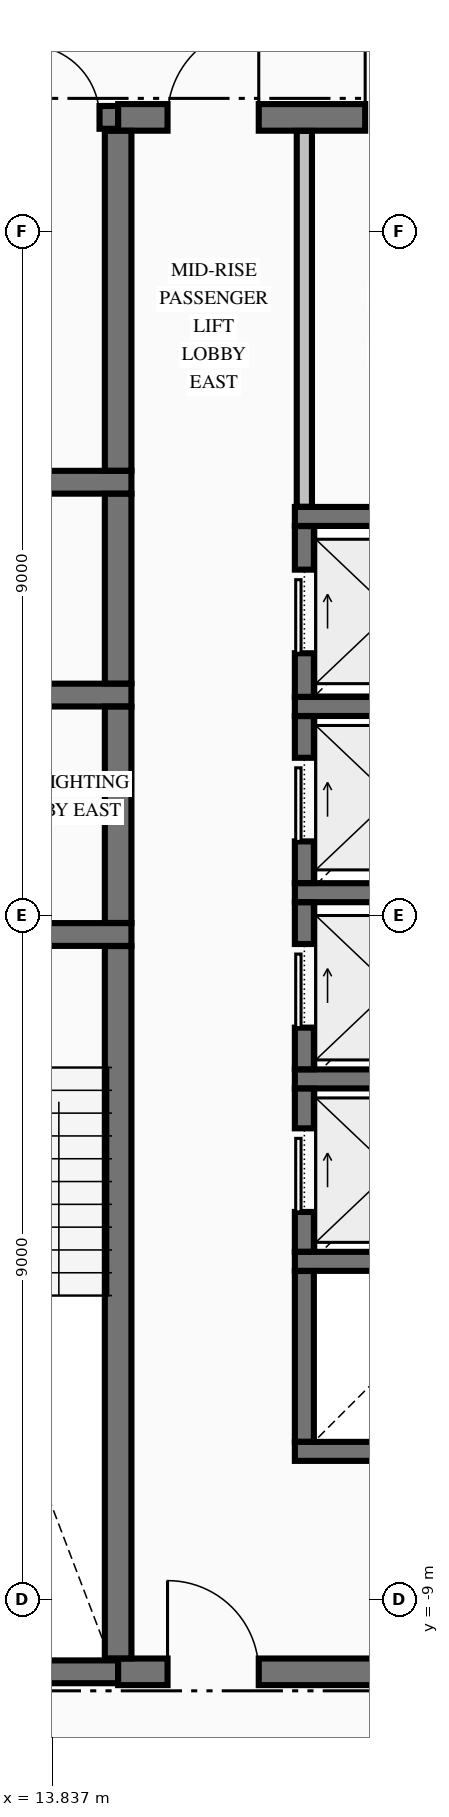
"""IFC4 building model, lengths in metres.
Left out: names, types, materials, properties, quantities, classifications, styles, units other than length and angle.
Written with IfcOpenShell. Run it as: python <this file> out.ifc"""

import sys

from ifc_helpers import new_model, si_unit, direction, frame, frame_2d, origin, place, context, subcontext, project, spatial, rectangle, extrude, element, fill, save


model = new_model("IFC4")
c1 = context("Model", 3, precision=1e-05, world=origin(), true_north=direction((0.0, 1.0)))
c2 = subcontext(c1, "Body", "Model", "MODEL_VIEW")
j1 = project(units=[si_unit("LENGTHUNIT", "METRE"), si_unit("PLANEANGLEUNIT", "RADIAN")], contexts=[c1])
p1 = place(None, origin())
s1 = spatial("IfcSite", under=j1, at=p1, CompositionType="ELEMENT")
p2 = place(p1, origin())
s2 = spatial("IfcBuilding", under=s1, at=p2, CompositionType="ELEMENT")
p3 = place(p2, frame((0.0, 0.0, 112.78)))
s3 = spatial("IfcBuildingStorey", under=s2, at=p3, CompositionType="ELEMENT", Elevation=112.78)
p4 = place(p3, frame((11.504, -9.95, 0.0), z_axis=(0.0, 0.0, 1.0), x_axis=(1.0, 0.0, 0.0)))
e1 = element("IfcWall", 1, at=p4, inside=s3, PredefinedType="SHEAR", context=c2, shape_type="SweptSolid", body=[
    extrude(rectangle(XDim=3.196, YDim=0.3, at=frame_2d((1.598, 0.0))), origin(), (0.0, 0.0, 1.0), 3.145),
])
p5 = place(p3, frame((14.7, -9.95, 0.0), z_axis=(0.0, 0.0, 1.0), x_axis=(1.0, 0.0, 0.0)))
e2 = element("IfcWall", 2, at=p5, inside=s3, PredefinedType="SHEAR", context=c2, shape_type="SweptSolid", body=[
    extrude(rectangle(XDim=4.796, YDim=0.35, at=frame_2d((2.398, 0.0))), origin(), (0.0, 0.0, 1.0), 3.145),
])
p6 = place(p5, frame((0.65, 0.0, 0.0)))
e3 = element("IfcOpeningElement", 3, at=p6, cuts=e2, PredefinedType="OPENING", context=c2, shape_type="SweptSolid", body=[
    extrude(rectangle(XDim=1.2, YDim=2.15, at=frame_2d((0.6, 1.075))), frame((0.0, 0.185, 0.0), z_axis=(0.0, -1.0, 0.0), x_axis=(1.0, 0.0, 0.0)), (0.0, 0.0, 1.0), 0.37),
])
for number, where, z_axis, x_axis in (
    (4, (17.025, -7.05, 0.0), (0.0, 0.0, 1.0), (1.0, 0.0, 0.0)),
    (5, (17.025, -4.55, 0.0), (0.0, 0.0, 1.0), (1.0, 0.0, 0.0)),
    (6, (17.025, -2.15, 0.0), (0.0, 0.0, 1.0), (1.0, 0.0, 0.0)),
):
    element("IfcWall", number, at=place(p3, frame(where, z_axis=z_axis, x_axis=x_axis)), inside=s3, PredefinedType="SOLIDWALL", context=c2, shape_type="SweptSolid", body=[
        extrude(rectangle(XDim=3.15, YDim=0.25, at=frame_2d((1.575, 0.0))), origin(), (0.0, 0.0, 1.0), 3.145),
    ])
p7 = place(p3, frame((11.504, -0.25, 0.0), z_axis=(0.0, 0.0, 1.0), x_axis=(1.0, 0.0, 0.0)))
e7 = element("IfcWall", 7, at=p7, inside=s3, PredefinedType="SHEAR", context=c2, shape_type="SweptSolid", body=[
    extrude(rectangle(XDim=3.371, YDim=0.3, at=frame_2d((1.686, 0.0))), origin(), (0.0, 0.0, 1.0), 3.145),
])
p8 = place(p7, frame((1.096, 0.0, 0.0)))
e8 = element("IfcOpeningElement", 8, at=p8, cuts=e7, PredefinedType="OPENING", context=c2, shape_type="SweptSolid", body=[
    extrude(rectangle(XDim=1.1, YDim=2.15, at=frame_2d((0.55, 1.075))), frame((0.0, 0.16, 0.0), z_axis=(0.0, -1.0, 0.0), x_axis=(1.0, 0.0, 0.0)), (0.0, 0.0, 1.0), 0.32),
])
p9 = place(p3, frame((17.025, 0.3, 0.0), z_axis=(0.0, 0.0, 1.0), x_axis=(1.0, 0.0, 0.0)))
e9 = element("IfcWall", 9, at=p9, inside=s3, PredefinedType="SOLIDWALL", context=c2, shape_type="SweptSolid", body=[
    extrude(rectangle(XDim=2.471, YDim=0.25, at=frame_2d((1.236, 0.0))), origin(), (0.0, 0.0, 1.0), 3.145),
])
p10 = place(p3, frame((17.025, 2.75, 0.0), z_axis=(0.0, 0.0, 1.0), x_axis=(1.0, 0.0, 0.0)))
e10 = element("IfcWall", 10, at=p10, inside=s3, PredefinedType="SOLIDWALL", context=c2, shape_type="SweptSolid", body=[
    extrude(rectangle(XDim=3.15, YDim=0.25, at=frame_2d((1.575, 0.0))), origin(), (0.0, 0.0, 1.0), 3.145),
])
p11 = place(p3, frame((10.85, 2.9, 0.0), z_axis=(0.0, 0.0, 1.0), x_axis=(1.0, 0.0, 0.0)))
e11 = element("IfcWall", 11, at=p11, inside=s3, PredefinedType="SHEAR", context=c2, shape_type="SweptSolid", body=[
    extrude(rectangle(XDim=4.025, YDim=0.3, at=frame_2d((2.012, 0.0))), origin(), (0.0, 0.0, 1.0), 3.145),
])
p12 = place(p11, frame((0.85, 0.0, 0.0)))
e12 = element("IfcOpeningElement", 12, at=p12, cuts=e11, PredefinedType="OPENING", context=c2, shape_type="SweptSolid", body=[
    extrude(rectangle(XDim=1.1, YDim=2.2, at=frame_2d((0.55, 1.1))), frame((0.0, 0.16, 0.0), z_axis=(0.0, -1.0, 0.0), x_axis=(1.0, 0.0, 0.0)), (0.0, 0.0, 1.0), 0.32),
])
p13 = place(p3, frame((17.025, 5.25, 0.0), z_axis=(0.0, 0.0, 1.0), x_axis=(1.0, 0.0, 0.0)))
e13 = element("IfcWall", 13, at=p13, inside=s3, PredefinedType="SOLIDWALL", context=c2, shape_type="SweptSolid", body=[
    extrude(rectangle(XDim=3.15, YDim=0.25, at=frame_2d((1.575, 0.0))), origin(), (0.0, 0.0, 1.0), 3.145),
])
p14 = place(p3, frame((10.85, 5.7, 0.0), z_axis=(0.0, 0.0, 1.0), x_axis=(1.0, 0.0, 0.0)))
e14 = element("IfcWall", 14, at=p14, inside=s3, PredefinedType="SHEAR", context=c2, shape_type="SweptSolid", body=[
    extrude(rectangle(XDim=4.025, YDim=0.3, at=frame_2d((2.012, 0.0))), origin(), (0.0, 0.0, 1.0), 3.145),
])
p15 = place(p3, frame((11.504, 10.5, 0.0), z_axis=(0.0, 0.0, 1.0), x_axis=(1.0, 0.0, 0.0)))
e15 = element("IfcWall", 15, at=p15, inside=s3, PredefinedType="SHEAR", context=c2, shape_type="SweptSolid", body=[
    extrude(rectangle(XDim=3.196, YDim=0.3, at=frame_2d((1.598, 0.0))), origin(), (0.0, 0.0, 1.0), 3.145),
])
p16 = place(p15, frame((2.001, 0.0, 0.0)))
e16 = element("IfcOpeningElement", 16, at=p16, cuts=e15, PredefinedType="OPENING", context=c2, shape_type="SweptSolid", body=[
    extrude(rectangle(XDim=0.95, YDim=2.15, at=frame_2d((0.475, 1.075))), frame((0.0, 0.16, 0.0), z_axis=(0.0, -1.0, 0.0), x_axis=(1.0, 0.0, 0.0)), (0.0, 0.0, 1.0), 0.32),
])
p17 = place(p3, frame((14.7, 10.5, 0.0), z_axis=(0.0, 0.0, 1.0), x_axis=(1.0, 0.0, 0.0)))
e17 = element("IfcWall", 17, at=p17, inside=s3, PredefinedType="SHEAR", context=c2, shape_type="SweptSolid", body=[
    extrude(rectangle(XDim=4.796, YDim=0.35, at=frame_2d((2.398, 0.0))), origin(), (0.0, 0.0, 1.0), 3.145),
])
p18 = place(p17, frame((0.65, 0.0, 0.0)))
e18 = element("IfcOpeningElement", 18, at=p18, cuts=e17, PredefinedType="OPENING", context=c2, shape_type="SweptSolid", body=[
    extrude(rectangle(XDim=1.2, YDim=2.15, at=frame_2d((0.6, 1.075))), frame((0.0, 0.185, 0.0), z_axis=(0.0, -1.0, 0.0), x_axis=(1.0, 0.0, 0.0)), (0.0, 0.0, 1.0), 0.37),
])
p19 = place(p17, frame((3.25, 0.0, 0.0)))
e19 = element("IfcOpeningElement", 19, at=p19, cuts=e17, PredefinedType="OPENING", context=c2, shape_type="SweptSolid", body=[
    extrude(rectangle(XDim=0.9, YDim=2.15, at=frame_2d((0.45, 1.075))), frame((0.0, 0.185, 0.0), z_axis=(0.0, -1.0, 0.0), x_axis=(1.0, 0.0, 0.0)), (0.0, 0.0, 1.0), 0.37),
])
p20 = place(p3, frame((14.7, -9.773, 0.0), z_axis=(0.0, 0.0, 1.0), x_axis=(0.0, 1.0, 0.0)))
e20 = element("IfcWall", 20, at=p20, inside=s3, PredefinedType="SHEAR", context=c2, shape_type="SweptSolid", body=[
    extrude(rectangle(XDim=9.371, YDim=0.35, at=frame_2d((4.686, 0.0))), origin(), (0.0, 0.0, 1.0), 3.145),
])
p21 = place(p3, frame((14.7, -0.098, 0.0), z_axis=(0.0, 0.0, 1.0), x_axis=(0.0, 1.0, 0.0)))
e21 = element("IfcWall", 21, at=p21, inside=s3, PredefinedType="SHEAR", context=c2, shape_type="SweptSolid", body=[
    extrude(rectangle(XDim=2.846, YDim=0.35, at=frame_2d((1.423, 0.0))), origin(), (0.0, 0.0, 1.0), 3.145),
])
p22 = place(p3, frame((14.7, 3.052, 0.0), z_axis=(0.0, 0.0, 1.0), x_axis=(0.0, 1.0, 0.0)))
e22 = element("IfcWall", 22, at=p22, inside=s3, PredefinedType="SHEAR", context=c2, shape_type="SweptSolid", body=[
    extrude(rectangle(XDim=2.496, YDim=0.35, at=frame_2d((1.248, 0.0))), origin(), (0.0, 0.0, 1.0), 3.145),
])
p23 = place(p3, frame((14.7, 5.852, 0.0), z_axis=(0.0, 0.0, 1.0), x_axis=(0.0, 1.0, 0.0)))
e23 = element("IfcWall", 23, at=p23, inside=s3, PredefinedType="SHEAR", context=c2, shape_type="SweptSolid", body=[
    extrude(rectangle(XDim=4.471, YDim=0.35, at=frame_2d((2.235, 0.0))), origin(), (0.0, 0.0, 1.0), 3.145),
])
p24 = place(p3, frame((17.15, -6.923, 0.0), z_axis=(0.0, 0.0, 1.0), x_axis=(0.0, 1.0, 0.0)))
e24 = element("IfcWall", 24, at=p24, inside=s3, PredefinedType="SOLIDWALL", context=c2, shape_type="SweptSolid", body=[
    extrude(rectangle(XDim=2.246, YDim=0.25, at=frame_2d((1.123, 0.0))), origin(), (0.0, 0.0, 1.0), 3.145),
])
p25 = place(p3, frame((17.15, -4.423, 0.0), z_axis=(0.0, 0.0, 1.0), x_axis=(0.0, 1.0, 0.0)))
e25 = element("IfcWall", 25, at=p25, inside=s3, PredefinedType="SOLIDWALL", context=c2, shape_type="SweptSolid", body=[
    extrude(rectangle(XDim=2.146, YDim=0.25, at=frame_2d((1.073, 0.0))), origin(), (0.0, 0.0, 1.0), 3.145),
])
p26 = place(p25, frame((0.523, 0.0, 0.0)))
e26 = element("IfcOpeningElement", 26, at=p26, cuts=e25, PredefinedType="OPENING", context=c2, shape_type="SweptSolid", body=[
    extrude(rectangle(XDim=1.1, YDim=2.2, at=frame_2d((0.55, 1.1))), frame((0.0, 0.135, 0.0), z_axis=(0.0, -1.0, 0.0), x_axis=(1.0, 0.0, 0.0)), (0.0, 0.0, 1.0), 0.27),
])
p27 = place(p3, frame((17.15, -2.023, 0.0), z_axis=(0.0, 0.0, 1.0), x_axis=(0.0, 1.0, 0.0)))
e27 = element("IfcWall", 27, at=p27, inside=s3, PredefinedType="SOLIDWALL", context=c2, shape_type="SweptSolid", body=[
    extrude(rectangle(XDim=2.196, YDim=0.25, at=frame_2d((1.098, 0.0))), origin(), (0.0, 0.0, 1.0), 3.145),
])
p28 = place(p27, frame((0.548, 0.0, 0.0)))
e28 = element("IfcOpeningElement", 28, at=p28, cuts=e27, PredefinedType="OPENING", context=c2, shape_type="SweptSolid", body=[
    extrude(rectangle(XDim=1.1, YDim=2.2, at=frame_2d((0.55, 1.1))), frame((0.0, 0.135, 0.0), z_axis=(0.0, -1.0, 0.0), x_axis=(1.0, 0.0, 0.0)), (0.0, 0.0, 1.0), 0.27),
])
p29 = place(p3, frame((17.15, 0.427, 0.0), z_axis=(0.0, 0.0, 1.0), x_axis=(0.0, 1.0, 0.0)))
e29 = element("IfcWall", 29, at=p29, inside=s3, PredefinedType="SOLIDWALL", context=c2, shape_type="SweptSolid", body=[
    extrude(rectangle(XDim=2.196, YDim=0.25, at=frame_2d((1.098, 0.0))), origin(), (0.0, 0.0, 1.0), 3.145),
])
p30 = place(p29, frame((0.548, 0.0, 0.0)))
e30 = element("IfcOpeningElement", 30, at=p30, cuts=e29, PredefinedType="OPENING", context=c2, shape_type="SweptSolid", body=[
    extrude(rectangle(XDim=1.1, YDim=2.2, at=frame_2d((0.55, 1.1))), frame((0.0, 0.135, 0.0), z_axis=(0.0, -1.0, 0.0), x_axis=(1.0, 0.0, 0.0)), (0.0, 0.0, 1.0), 0.27),
])
p31 = place(p3, frame((17.15, 2.877, 0.0), z_axis=(0.0, 0.0, 1.0), x_axis=(0.0, 1.0, 0.0)))
e31 = element("IfcWall", 31, at=p31, inside=s3, PredefinedType="SOLIDWALL", context=c2, shape_type="SweptSolid", body=[
    extrude(rectangle(XDim=2.246, YDim=0.25, at=frame_2d((1.123, 0.0))), origin(), (0.0, 0.0, 1.0), 3.145),
])
p32 = place(p31, frame((0.573, 0.0, 0.0)))
e32 = element("IfcOpeningElement", 32, at=p32, cuts=e31, PredefinedType="OPENING", context=c2, shape_type="SweptSolid", body=[
    extrude(rectangle(XDim=1.1, YDim=2.2, at=frame_2d((0.55, 1.1))), frame((0.0, 0.135, 0.0), z_axis=(0.0, -1.0, 0.0), x_axis=(1.0, 0.0, 0.0)), (0.0, 0.0, 1.0), 0.27),
])
p33 = place(p3, frame((17.15, 5.378, 0.0), z_axis=(0.0, 0.0, 1.0), x_axis=(0.0, 1.0, 0.0)))
e33 = element("IfcWall", 33, at=p33, inside=s3, PredefinedType="PARTITIONING", context=c2, shape_type="SweptSolid", body=[
    extrude(rectangle(XDim=4.944, YDim=0.2, at=frame_2d((2.472, 0.0))), origin(), (0.0, 0.0, 1.0), 3.145),
])
p34 = place(p16, origin())
e34 = element("IfcDoor", 34, at=p34, inside=s3, OperationType="SINGLE_SWING_LEFT", PredefinedType="DOOR", context=c2, shape_type="SweptSolid", body=[
    extrude(rectangle(XDim=0.95, YDim=2.15, at=frame_2d((0.475, 1.075))), frame((0.0, 0.025, 0.0), z_axis=(0.0, -1.0, 0.0), x_axis=(1.0, 0.0, 0.0)), (0.0, 0.0, 1.0), 0.05),
])
fill(e16, e34)
p35 = place(p26, origin())
e35 = element("IfcDoor", 35, at=p35, inside=s3, OperationType="SLIDING_TO_RIGHT", PredefinedType="DOOR", context=c2, shape_type="SweptSolid", body=[
    extrude(rectangle(XDim=1.1, YDim=2.2, at=frame_2d((0.55, 1.1))), frame((0.0, 0.025, 0.0), z_axis=(0.0, -1.0, 0.0), x_axis=(1.0, 0.0, 0.0)), (0.0, 0.0, 1.0), 0.05),
])
fill(e26, e35)
p36 = place(p28, origin())
e36 = element("IfcDoor", 36, at=p36, inside=s3, OperationType="SLIDING_TO_RIGHT", PredefinedType="DOOR", context=c2, shape_type="SweptSolid", body=[
    extrude(rectangle(XDim=1.1, YDim=2.2, at=frame_2d((0.55, 1.1))), frame((0.0, 0.025, 0.0), z_axis=(0.0, -1.0, 0.0), x_axis=(1.0, 0.0, 0.0)), (0.0, 0.0, 1.0), 0.05),
])
fill(e28, e36)
p37 = place(p30, origin())
e37 = element("IfcDoor", 37, at=p37, inside=s3, OperationType="SLIDING_TO_RIGHT", PredefinedType="DOOR", context=c2, shape_type="SweptSolid", body=[
    extrude(rectangle(XDim=1.1, YDim=2.2, at=frame_2d((0.55, 1.1))), frame((0.0, 0.025, 0.0), z_axis=(0.0, -1.0, 0.0), x_axis=(1.0, 0.0, 0.0)), (0.0, 0.0, 1.0), 0.05),
])
fill(e30, e37)
p38 = place(p32, origin())
e38 = element("IfcDoor", 38, at=p38, inside=s3, OperationType="SLIDING_TO_RIGHT", PredefinedType="DOOR", context=c2, shape_type="SweptSolid", body=[
    extrude(rectangle(XDim=1.1, YDim=2.2, at=frame_2d((0.55, 1.1))), frame((0.0, 0.025, 0.0), z_axis=(0.0, -1.0, 0.0), x_axis=(1.0, 0.0, 0.0)), (0.0, 0.0, 1.0), 0.05),
])
fill(e32, e38)
p39 = place(p6, origin())
e39 = element("IfcDoor", 39, at=p39, inside=s3, OperationType="SINGLE_SWING_LEFT", PredefinedType="DOOR", context=c2, shape_type="SweptSolid", body=[
    extrude(rectangle(XDim=1.2, YDim=2.15, at=frame_2d((0.6, 1.075))), frame((0.0, 0.025, 0.0), z_axis=(0.0, -1.0, 0.0), x_axis=(1.0, 0.0, 0.0)), (0.0, 0.0, 1.0), 0.05),
])
fill(e3, e39)
p40 = place(p18, origin())
e40 = element("IfcDoor", 40, at=p40, inside=s3, OperationType="SINGLE_SWING_RIGHT", PredefinedType="DOOR", context=c2, shape_type="SweptSolid", body=[
    extrude(rectangle(XDim=1.2, YDim=2.15, at=frame_2d((0.6, 1.075))), frame((0.0, 0.025, 0.0), z_axis=(0.0, -1.0, 0.0), x_axis=(1.0, 0.0, 0.0)), (0.0, 0.0, 1.0), 0.05),
])
fill(e18, e40)
p41 = place(p19, origin())
e41 = element("IfcDoor", 41, at=p41, inside=s3, OperationType="SINGLE_SWING_LEFT", PredefinedType="DOOR", context=c2, shape_type="SweptSolid", body=[
    extrude(rectangle(XDim=0.9, YDim=2.15, at=frame_2d((0.45, 1.075))), frame((0.0, 0.025, 0.0), z_axis=(0.0, -1.0, 0.0), x_axis=(1.0, 0.0, 0.0)), (0.0, 0.0, 1.0), 0.05),
])
fill(e19, e41)
save(model, sys.argv[1])
